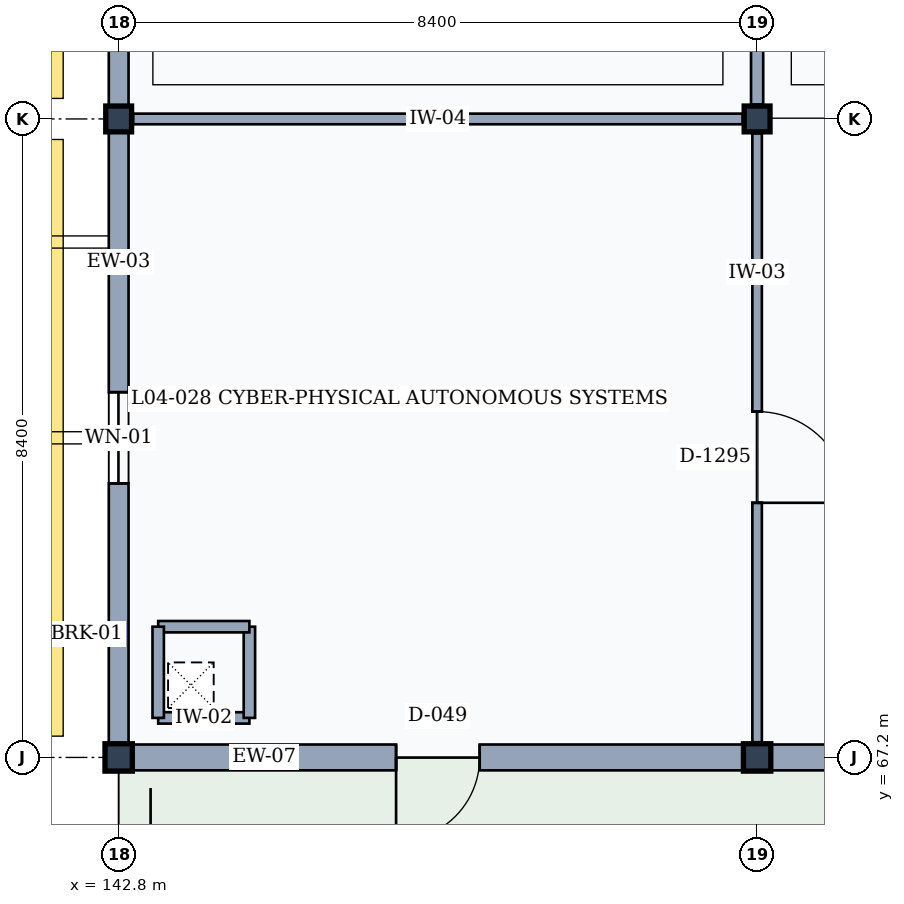
"""IFC4 building model, lengths in metres.
Left out: names, types, materials, properties, quantities, classifications, styles, units other than length and angle.
Written with IfcOpenShell. Run it as: python <this file> out.ifc"""

import sys

from ifc_helpers import new_model, si_unit, direction, frame, frame_2d, origin, origin_2d, place, context, subcontext, project, spatial, rectangle, extrude, element, fill, save


model = new_model("IFC4")
c1 = context("Model", 3, precision=1e-05, world=origin(), true_north=direction((0.0, 1.0)))
c2 = subcontext(c1, "Body", "Model", "MODEL_VIEW")
j1 = project(units=[si_unit("LENGTHUNIT", "METRE"), si_unit("PLANEANGLEUNIT", "RADIAN")], contexts=[c1])
p1 = place(None, origin())
s1 = spatial("IfcSite", under=j1, at=p1, CompositionType="ELEMENT")
p2 = place(p1, origin())
s2 = spatial("IfcBuilding", under=s1, at=p2, CompositionType="ELEMENT")
p3 = place(p2, frame((0.0, 0.0, 18.0)))
s3 = spatial("IfcBuildingStorey", under=s2, at=p3, CompositionType="ELEMENT", Elevation=18.0)
p4 = place(p3, frame((142.8, 67.2, 0.0), z_axis=(0.0, 0.0, 1.0), x_axis=(1.0, 0.0, 0.0)))
e1 = element("IfcColumn", 1, at=p4, inside=s3, PredefinedType="COLUMN", context=c2, shape_type="SweptSolid", body=[
    extrude(rectangle(XDim=0.36, YDim=0.36, at=origin_2d()), origin(), (0.0, 0.0, 1.0), 4.2),
])
p5 = place(p3, frame((142.8, 75.6, 0.0), z_axis=(0.0, 0.0, 1.0), x_axis=(1.0, 0.0, 0.0)))
e2 = element("IfcColumn", 2, at=p5, inside=s3, PredefinedType="COLUMN", context=c2, shape_type="SweptSolid", body=[
    extrude(rectangle(XDim=0.34, YDim=0.34, at=origin_2d()), origin(), (0.0, 0.0, 1.0), 4.2),
])
p6 = place(p3, frame((151.2, 67.2, 0.0), z_axis=(0.0, 0.0, 1.0), x_axis=(1.0, 0.0, 0.0)))
e3 = element("IfcColumn", 3, at=p6, inside=s3, PredefinedType="COLUMN", context=c2, shape_type="SweptSolid", body=[
    extrude(rectangle(XDim=0.36, YDim=0.36, at=origin_2d()), origin(), (0.0, 0.0, 1.0), 4.2),
])
p7 = place(p3, frame((151.2, 75.6, 0.0), z_axis=(0.0, 0.0, 1.0), x_axis=(1.0, 0.0, 0.0)))
e4 = element("IfcColumn", 4, at=p7, inside=s3, PredefinedType="COLUMN", context=c2, shape_type="SweptSolid", body=[
    extrude(rectangle(XDim=0.34, YDim=0.34, at=origin_2d()), origin(), (0.0, 0.0, 1.0), 4.2),
])
p8 = place(p3, frame((151.02, 67.2, 0.0), z_axis=(0.0, 0.0, 1.0), x_axis=(-1.0, 0.0, 0.0)))
e5 = element("IfcWall", 5, at=p8, inside=s3, PredefinedType="SOLIDWALL", context=c2, shape_type="SweptSolid", body=[
    extrude(rectangle(XDim=8.04, YDim=0.34, at=frame_2d((4.02, 0.0))), origin(), (0.0, 0.0, 1.0), 3.36),
])
p9 = place(p8, frame((3.47, 0.0, 0.0)))
e6 = element("IfcOpeningElement", 6, at=p9, cuts=e5, PredefinedType="OPENING", context=c2, shape_type="SweptSolid", body=[
    extrude(rectangle(XDim=1.1, YDim=2.2, at=frame_2d((0.55, 1.1))), frame((0.0, 0.18, 0.0), z_axis=(0.0, -1.0, 0.0), x_axis=(1.0, 0.0, 0.0)), (0.0, 0.0, 1.0), 0.36),
])
p10 = place(p3, frame((142.8, 67.38, 0.0), z_axis=(0.0, 0.0, 1.0), x_axis=(0.0, 1.0, 0.0)))
e7 = element("IfcWall", 7, at=p10, inside=s3, PredefinedType="SOLIDWALL", context=c2, shape_type="SweptSolid", body=[
    extrude(rectangle(XDim=8.05, YDim=0.26, at=frame_2d((4.025, 0.0))), origin(), (0.0, 0.0, 1.0), 3.36),
])
p11 = place(p10, frame((3.425, 0.0, 0.9)))
e8 = element("IfcOpeningElement", 8, at=p11, cuts=e7, PredefinedType="OPENING", context=c2, shape_type="SweptSolid", body=[
    extrude(rectangle(XDim=1.2, YDim=1.8, at=frame_2d((0.6, 0.9))), frame((0.0, 0.14, 0.0), z_axis=(0.0, -1.0, 0.0), x_axis=(1.0, 0.0, 0.0)), (0.0, 0.0, 1.0), 0.28),
])
p12 = place(p3, frame((142.8, 75.77, 0.0), z_axis=(0.0, 0.0, 1.0), x_axis=(0.0, 1.0, 0.0)))
e9 = element("IfcWall", 9, at=p12, inside=s3, PredefinedType="SOLIDWALL", context=c2, shape_type="SweptSolid", body=[
    extrude(rectangle(XDim=8.05, YDim=0.26, at=frame_2d((4.025, 0.0))), origin(), (0.0, 0.0, 1.0), 3.36),
])
p13 = place(p12, frame((3.325, 0.0, 0.9)))
e10 = element("IfcOpeningElement", 10, at=p13, cuts=e9, PredefinedType="OPENING", context=c2, shape_type="SweptSolid", body=[
    extrude(rectangle(XDim=1.4, YDim=2.1, at=frame_2d((0.7, 1.05))), frame((0.0, 0.14, 0.0), z_axis=(0.0, -1.0, 0.0), x_axis=(1.0, 0.0, 0.0)), (0.0, 0.0, 1.0), 0.28),
])
p14 = place(p3, frame((159.42, 67.2, 0.0), z_axis=(0.0, 0.0, 1.0), x_axis=(-1.0, 0.0, 0.0)))
e11 = element("IfcWall", 11, at=p14, inside=s3, PredefinedType="SOLIDWALL", context=c2, shape_type="SweptSolid", body=[
    extrude(rectangle(XDim=8.04, YDim=0.34, at=frame_2d((4.02, 0.0))), origin(), (0.0, 0.0, 1.0), 3.36),
])
p15 = place(p14, frame((3.47, 0.0, 0.0)))
e12 = element("IfcOpeningElement", 12, at=p15, cuts=e11, PredefinedType="OPENING", context=c2, shape_type="SweptSolid", body=[
    extrude(rectangle(XDim=1.1, YDim=2.2, at=frame_2d((0.55, 1.1))), frame((0.0, 0.18, 0.0), z_axis=(0.0, -1.0, 0.0), x_axis=(1.0, 0.0, 0.0)), (0.0, 0.0, 1.0), 0.36),
])
for number, where, z_axis, x_axis in (
    (13, (143.32, 67.72, 0.0), (0.0, 0.0, 1.0), (1.0, 0.0, 0.0)),
    (14, (144.52, 67.72, 0.0), (0.0, 0.0, 1.0), (0.0, 1.0, 0.0)),
    (15, (144.52, 68.92, 0.0), (0.0, 0.0, 1.0), (-1.0, 0.0, 0.0)),
    (16, (143.32, 68.92, 0.0), (0.0, 0.0, 1.0), (0.0, -1.0, 0.0)),
):
    element("IfcWall", number, at=place(p3, frame(where, z_axis=z_axis, x_axis=x_axis)), inside=s3, PredefinedType="PARTITIONING", context=c2, shape_type="SweptSolid", body=[
        extrude(rectangle(XDim=1.2, YDim=0.15, at=frame_2d((0.6, 0.0))), origin(), (0.0, 0.0, 1.0), 3.98),
    ])
p16 = place(p3, frame((151.2, 67.4, 0.0), z_axis=(0.0, 0.0, 1.0), x_axis=(0.0, 1.0, 0.0)))
e17 = element("IfcWall", 17, at=p16, inside=s3, PredefinedType="PARTITIONING", context=c2, shape_type="SweptSolid", body=[
    extrude(rectangle(XDim=8.01, YDim=0.125, at=frame_2d((4.005, 0.0))), origin(), (0.0, 0.0, 1.0), 3.32),
])
p17 = place(p16, frame((3.15, 0.0, 0.0)))
e18 = element("IfcOpeningElement", 18, at=p17, cuts=e17, PredefinedType="OPENING", context=c2, shape_type="SweptSolid", body=[
    extrude(rectangle(XDim=1.2, YDim=2.2, at=frame_2d((0.6, 1.1))), frame((0.0, 0.073, 0.0), z_axis=(0.0, -1.0, 0.0), x_axis=(1.0, 0.0, 0.0)), (0.0, 0.0, 1.0), 0.145),
])
p18 = place(p3, frame((142.99, 75.6, 0.0), z_axis=(0.0, 0.0, 1.0), x_axis=(1.0, 0.0, 0.0)))
e19 = element("IfcWall", 19, at=p18, inside=s3, PredefinedType="PARTITIONING", context=c2, shape_type="SweptSolid", body=[
    extrude(rectangle(XDim=8.02, YDim=0.14, at=frame_2d((4.01, 0.0))), origin(), (0.0, 0.0, 1.0), 3.32),
])
p19 = place(p3, frame((151.2, 75.79, 0.0), z_axis=(0.0, 0.0, 1.0), x_axis=(0.0, 1.0, 0.0)))
e20 = element("IfcWall", 20, at=p19, inside=s3, PredefinedType="PARTITIONING", context=c2, shape_type="SweptSolid", body=[
    extrude(rectangle(XDim=8.01, YDim=0.16, at=frame_2d((4.005, 0.0))), origin(), (0.0, 0.0, 1.0), 3.32),
])
p20 = place(p9, origin())
e21 = element("IfcDoor", 21, at=p20, inside=s3, OperationType="SINGLE_SWING_RIGHT", PredefinedType="DOOR", context=c2, shape_type="SweptSolid", body=[
    extrude(rectangle(XDim=1.1, YDim=2.2, at=frame_2d((0.55, 1.1))), frame((0.0, 0.025, 0.0), z_axis=(0.0, -1.0, 0.0), x_axis=(1.0, 0.0, 0.0)), (0.0, 0.0, 1.0), 0.05),
])
fill(e6, e21)
p21 = place(p11, origin())
e22 = element("IfcWindow", 22, at=p21, inside=s3, PartitioningType="SINGLE_PANEL", PredefinedType="WINDOW", context=c2, shape_type="SweptSolid", body=[
    extrude(rectangle(XDim=1.2, YDim=1.8, at=frame_2d((0.6, 0.9))), frame((0.0, 0.03, 0.0), z_axis=(0.0, -1.0, 0.0), x_axis=(1.0, 0.0, 0.0)), (0.0, 0.0, 1.0), 0.06),
])
fill(e8, e22)
p22 = place(p17, frame((1.2, 0.0, 0.0), z_axis=(0.0, 0.0, 1.0), x_axis=(-1.0, 0.0, 0.0)))
e23 = element("IfcDoor", 23, at=p22, inside=s3, OperationType="SINGLE_SWING_RIGHT", PredefinedType="DOOR", context=c2, shape_type="SweptSolid", body=[
    extrude(rectangle(XDim=1.2, YDim=2.2, at=frame_2d((0.6, 1.1))), frame((0.0, 0.025, 0.0), z_axis=(0.0, -1.0, 0.0), x_axis=(1.0, 0.0, 0.0)), (0.0, 0.0, 1.0), 0.05),
])
fill(e18, e23)
save(model, sys.argv[1])
